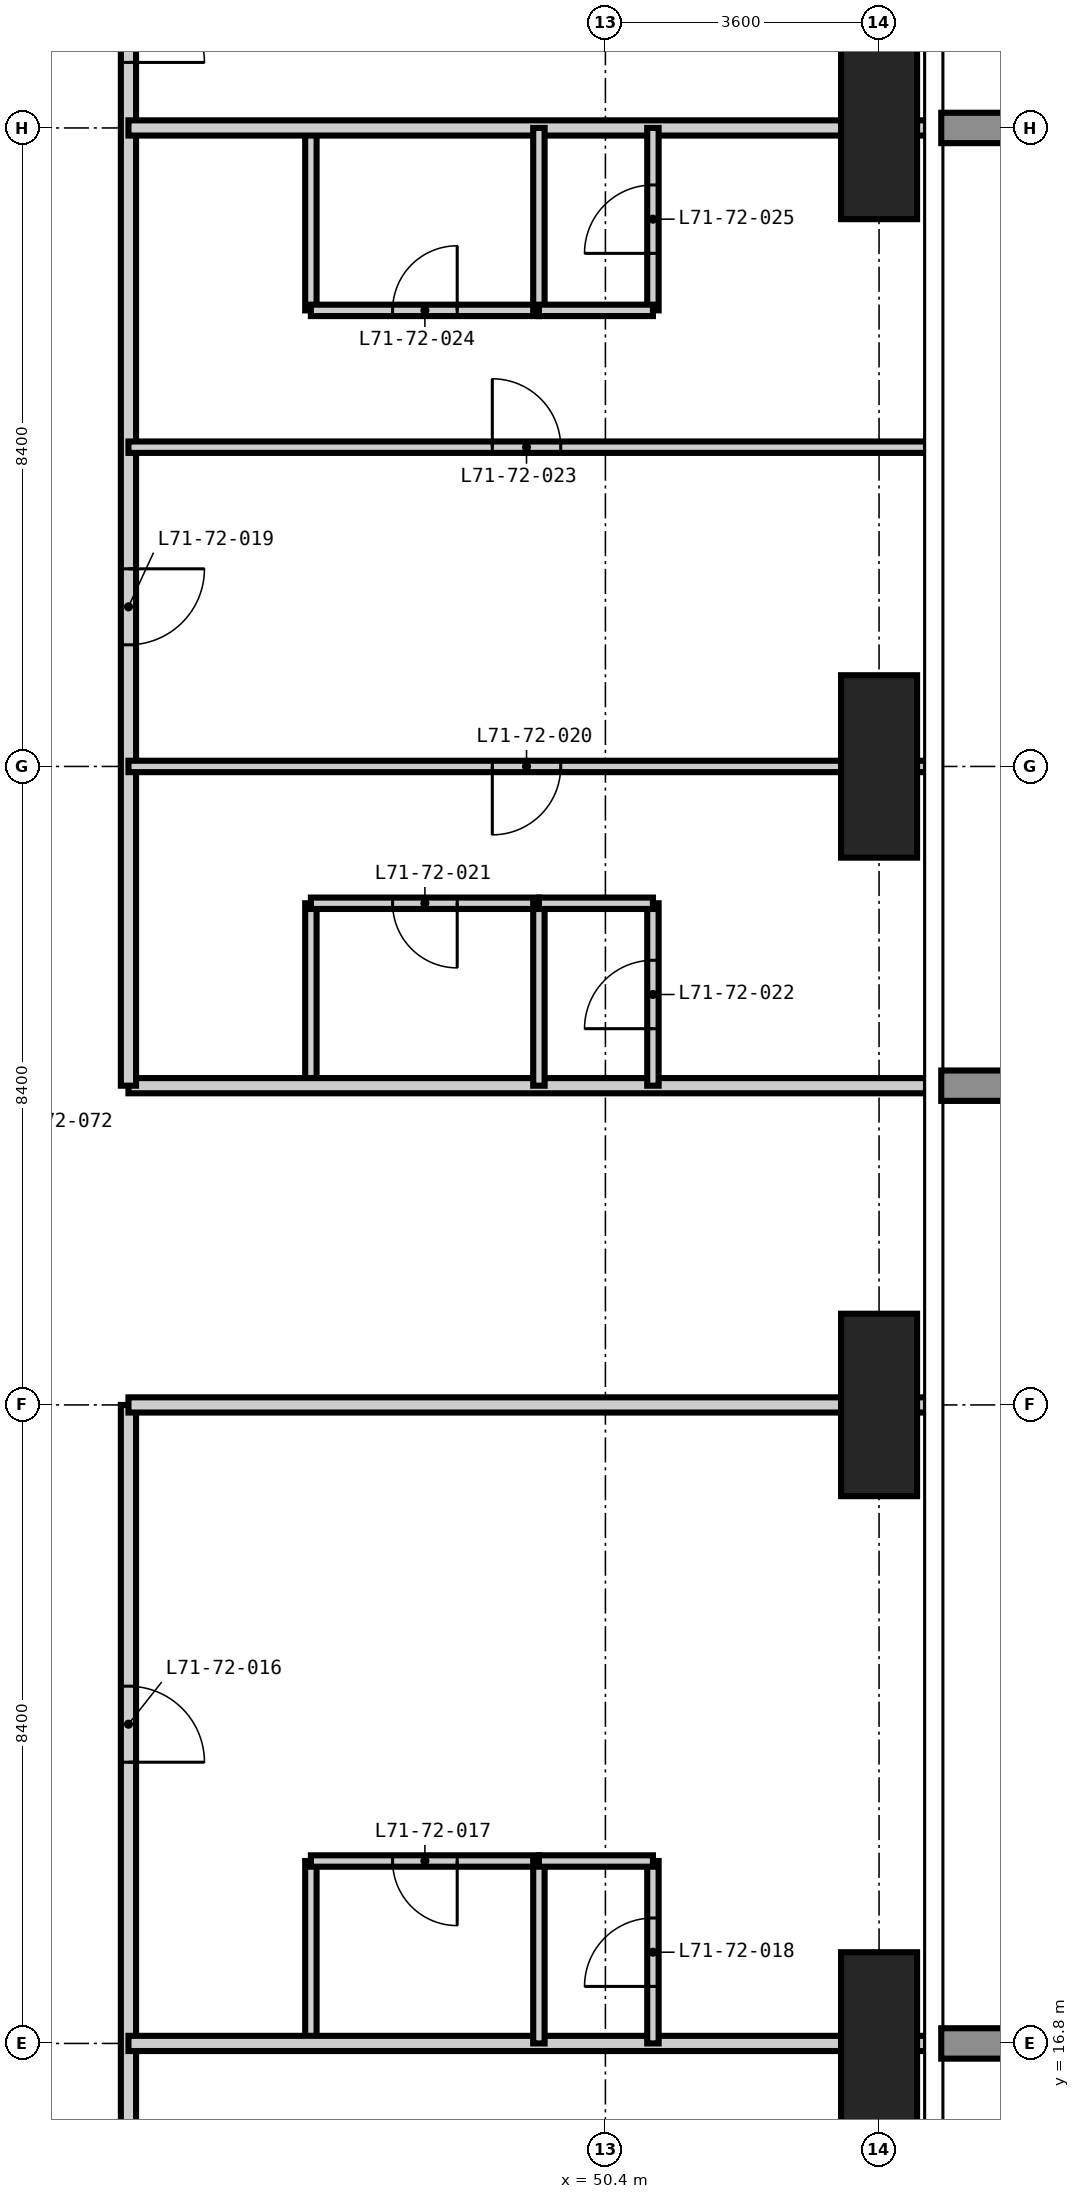
"""IFC4 building model, lengths in metres.
Left out: names, types, materials, properties, quantities, classifications, styles, units other than length and angle.
Written with IfcOpenShell. Run it as: python <this file> out.ifc"""

import sys

from ifc_helpers import new_model, si_unit, direction, frame, frame_2d, origin, origin_2d, place, context, subcontext, project, spatial, rectangle, extrude, element, fill, save


model = new_model("IFC4")
c1 = context("Model", 3, precision=1e-05, world=origin(), true_north=direction((0.0, 1.0)))
c2 = subcontext(c1, "Body", "Model", "MODEL_VIEW")
j1 = project(units=[si_unit("LENGTHUNIT", "METRE"), si_unit("PLANEANGLEUNIT", "RADIAN")], contexts=[c1])
p1 = place(None, origin())
s1 = spatial("IfcSite", under=j1, at=p1, CompositionType="ELEMENT")
p2 = place(p1, origin())
s2 = spatial("IfcBuilding", under=s1, at=p2, CompositionType="ELEMENT")
p3 = place(p2, frame((0.0, 0.0, 276.3)))
s3 = spatial("IfcBuildingStorey", under=s2, at=p3, CompositionType="ELEMENT", Elevation=276.3)
for number, where, z_axis, x_axis in (
    (1, (54.0, 16.8, -0.35), (0.0, 0.0, 1.0), (1.0, 0.0, 0.0)),
    (2, (54.0, 25.2, -0.35), (0.0, 0.0, 1.0), (1.0, 0.0, 0.0)),
    (3, (54.0, 33.6, -0.35), (0.0, 0.0, 1.0), (1.0, 0.0, 0.0)),
    (4, (54.0, 42.0, -0.35), (0.0, 0.0, 1.0), (1.0, 0.0, 0.0)),
):
    element("IfcColumn", number, at=place(p3, frame(where, z_axis=z_axis, x_axis=x_axis)), inside=s3, PredefinedType="COLUMN", context=c2, shape_type="SweptSolid", body=[
        extrude(rectangle(XDim=1.0, YDim=2.4, at=origin_2d()), origin(), (0.0, 0.0, 1.0), 3.9),
    ])
p4 = place(p3, frame((46.525, 16.8, 0.0), z_axis=(0.0, 0.0, 1.0), x_axis=(0.0, 1.0, 0.0)))
e5 = element("IfcWall", 5, at=p4, inside=s3, PredefinedType="PARTITIONING", context=c2, shape_type="SweptSolid", body=[
    extrude(rectangle(XDim=2.4, YDim=0.15, at=frame_2d((1.2, 0.0))), origin(), (0.0, 0.0, 1.0), 3.55),
])
p5 = place(p3, frame((46.525, 29.4, 0.0), z_axis=(0.0, 0.0, 1.0), x_axis=(0.0, 1.0, 0.0)))
e6 = element("IfcWall", 6, at=p5, inside=s3, PredefinedType="PARTITIONING", context=c2, shape_type="SweptSolid", body=[
    extrude(rectangle(XDim=2.4, YDim=0.15, at=frame_2d((1.2, 0.0))), origin(), (0.0, 0.0, 1.0), 3.55),
])
p6 = place(p3, frame((46.525, 39.6, 0.0), z_axis=(0.0, 0.0, 1.0), x_axis=(0.0, 1.0, 0.0)))
e7 = element("IfcWall", 7, at=p6, inside=s3, PredefinedType="PARTITIONING", context=c2, shape_type="SweptSolid", body=[
    extrude(rectangle(XDim=2.4, YDim=0.15, at=frame_2d((1.2, 0.0))), origin(), (0.0, 0.0, 1.0), 3.55),
])
p7 = place(p3, frame((46.525, 19.2, 0.0), z_axis=(0.0, 0.0, 1.0), x_axis=(1.0, 0.0, 0.0)))
e8 = element("IfcWall", 8, at=p7, inside=s3, PredefinedType="PARTITIONING", context=c2, shape_type="SweptSolid", body=[
    extrude(rectangle(XDim=3.0, YDim=0.15, at=frame_2d((1.5, 0.0))), origin(), (0.0, 0.0, 1.0), 3.55),
])
p8 = place(p7, frame((1.075, 0.0, 0.0)))
e9 = element("IfcOpeningElement", 9, at=p8, cuts=e8, PredefinedType="OPENING", context=c2, shape_type="SweptSolid", body=[
    extrude(rectangle(XDim=0.85, YDim=2.1, at=frame_2d((0.425, 1.05))), frame((0.0, 0.085, 0.0), z_axis=(0.0, -1.0, 0.0), x_axis=(1.0, 0.0, 0.0)), (0.0, 0.0, 1.0), 0.17),
])
p9 = place(p3, frame((46.525, 31.8, 0.0), z_axis=(0.0, 0.0, 1.0), x_axis=(1.0, 0.0, 0.0)))
e10 = element("IfcWall", 10, at=p9, inside=s3, PredefinedType="PARTITIONING", context=c2, shape_type="SweptSolid", body=[
    extrude(rectangle(XDim=3.0, YDim=0.15, at=frame_2d((1.5, 0.0))), origin(), (0.0, 0.0, 1.0), 3.55),
])
p10 = place(p9, frame((1.075, 0.0, 0.0)))
e11 = element("IfcOpeningElement", 11, at=p10, cuts=e10, PredefinedType="OPENING", context=c2, shape_type="SweptSolid", body=[
    extrude(rectangle(XDim=0.85, YDim=2.1, at=frame_2d((0.425, 1.05))), frame((0.0, 0.085, 0.0), z_axis=(0.0, -1.0, 0.0), x_axis=(1.0, 0.0, 0.0)), (0.0, 0.0, 1.0), 0.17),
])
p11 = place(p3, frame((46.525, 39.6, 0.0), z_axis=(0.0, 0.0, 1.0), x_axis=(1.0, 0.0, 0.0)))
e12 = element("IfcWall", 12, at=p11, inside=s3, PredefinedType="PARTITIONING", context=c2, shape_type="SweptSolid", body=[
    extrude(rectangle(XDim=3.0, YDim=0.15, at=frame_2d((1.5, 0.0))), origin(), (0.0, 0.0, 1.0), 3.55),
])
p12 = place(p11, frame((1.075, 0.0, 0.0)))
e13 = element("IfcOpeningElement", 13, at=p12, cuts=e12, PredefinedType="OPENING", context=c2, shape_type="SweptSolid", body=[
    extrude(rectangle(XDim=0.85, YDim=2.1, at=frame_2d((0.425, 1.05))), frame((0.0, 0.085, 0.0), z_axis=(0.0, -1.0, 0.0), x_axis=(1.0, 0.0, 0.0)), (0.0, 0.0, 1.0), 0.17),
])
p13 = place(p3, frame((44.125, 29.4, 0.0), z_axis=(0.0, 0.0, 1.0), x_axis=(1.0, 0.0, 0.0)))
e14 = element("IfcWall", 14, at=p13, inside=s3, PredefinedType="PARTITIONING", context=c2, shape_type="SweptSolid", body=[
    extrude(rectangle(XDim=10.493, YDim=0.2, at=frame_2d((5.247, 0.0))), origin(), (0.0, 0.0, 1.0), 3.55),
])
p14 = place(p3, frame((44.125, 25.2, 0.0), z_axis=(0.0, 0.0, 1.0), x_axis=(0.0, -1.0, 0.0)))
e15 = element("IfcWall", 15, at=p14, inside=s3, PredefinedType="PARTITIONING", context=c2, shape_type="SweptSolid", body=[
    extrude(rectangle(XDim=11.725, YDim=0.2, at=frame_2d((5.862, 0.0))), origin(), (0.0, 0.0, 1.0), 3.55),
])
p15 = place(p14, frame((3.7, 0.0, 0.0)))
e16 = element("IfcOpeningElement", 16, at=p15, cuts=e15, PredefinedType="OPENING", context=c2, shape_type="SweptSolid", body=[
    extrude(rectangle(XDim=1.0, YDim=2.2, at=frame_2d((0.5, 1.1))), frame((0.0, 0.11, 0.0), z_axis=(0.0, -1.0, 0.0), x_axis=(1.0, 0.0, 0.0)), (0.0, 0.0, 1.0), 0.22),
])
p16 = place(p14, frame((9.563, 0.0, 0.0)))
e17 = element("IfcOpeningElement", 17, at=p16, cuts=e15, PredefinedType="OPENING", context=c2, shape_type="SweptSolid", body=[
    extrude(rectangle(XDim=1.0, YDim=2.2, at=frame_2d((0.5, 1.1))), frame((0.0, 0.11, 0.0), z_axis=(0.0, -1.0, 0.0), x_axis=(1.0, 0.0, 0.0)), (0.0, 0.0, 1.0), 0.22),
])
p17 = place(p3, frame((44.125, 44.725, 0.0), z_axis=(0.0, 0.0, 1.0), x_axis=(0.0, -1.0, 0.0)))
e18 = element("IfcWall", 18, at=p17, inside=s3, PredefinedType="PARTITIONING", context=c2, shape_type="SweptSolid", body=[
    extrude(rectangle(XDim=15.325, YDim=0.2, at=frame_2d((7.663, 0.0))), origin(), (0.0, 0.0, 1.0), 3.55),
])
p18 = place(p17, frame((8.525, 0.0, 0.0)))
e19 = element("IfcOpeningElement", 19, at=p18, cuts=e18, PredefinedType="OPENING", context=c2, shape_type="SweptSolid", body=[
    extrude(rectangle(XDim=1.0, YDim=2.2, at=frame_2d((0.5, 1.1))), frame((0.0, 0.11, 0.0), z_axis=(0.0, -1.0, 0.0), x_axis=(1.0, 0.0, 0.0)), (0.0, 0.0, 1.0), 0.22),
])
p19 = place(p17, frame((0.863, 0.0, 0.0)))
e20 = element("IfcOpeningElement", 20, at=p19, cuts=e18, PredefinedType="OPENING", context=c2, shape_type="SweptSolid", body=[
    extrude(rectangle(XDim=1.0, YDim=2.2, at=frame_2d((0.5, 1.1))), frame((0.0, 0.11, 0.0), z_axis=(0.0, -1.0, 0.0), x_axis=(1.0, 0.0, 0.0)), (0.0, 0.0, 1.0), 0.22),
])
for number, where, z_axis, x_axis in (
    (21, (54.618, 25.2, 0.0), (0.0, 0.0, 1.0), (-1.0, 0.0, 0.0)),
    (22, (44.125, 16.8, 0.0), (0.0, 0.0, 1.0), (1.0, 0.0, 0.0)),
    (23, (44.125, 42.0, 0.0), (0.0, 0.0, 1.0), (1.0, 0.0, 0.0)),
):
    element("IfcWall", number, at=place(p3, frame(where, z_axis=z_axis, x_axis=x_axis)), inside=s3, PredefinedType="PARTITIONING", context=c2, shape_type="SweptSolid", body=[
        extrude(rectangle(XDim=10.493, YDim=0.2, at=frame_2d((5.247, 0.0))), origin(), (0.0, 0.0, 1.0), 3.55),
    ])
p20 = place(p3, frame((49.525, 16.8, 0.0), z_axis=(0.0, 0.0, 1.0), x_axis=(0.0, 1.0, 0.0)))
e24 = element("IfcWall", 24, at=p20, inside=s3, PredefinedType="PARTITIONING", context=c2, shape_type="SweptSolid", body=[
    extrude(rectangle(XDim=2.4, YDim=0.15, at=frame_2d((1.2, 0.0))), origin(), (0.0, 0.0, 1.0), 3.55),
])
p21 = place(p3, frame((49.525, 29.4, 0.0), z_axis=(0.0, 0.0, 1.0), x_axis=(0.0, 1.0, 0.0)))
e25 = element("IfcWall", 25, at=p21, inside=s3, PredefinedType="PARTITIONING", context=c2, shape_type="SweptSolid", body=[
    extrude(rectangle(XDim=2.4, YDim=0.15, at=frame_2d((1.2, 0.0))), origin(), (0.0, 0.0, 1.0), 3.55),
])
p22 = place(p3, frame((49.525, 39.6, 0.0), z_axis=(0.0, 0.0, 1.0), x_axis=(0.0, 1.0, 0.0)))
e26 = element("IfcWall", 26, at=p22, inside=s3, PredefinedType="PARTITIONING", context=c2, shape_type="SweptSolid", body=[
    extrude(rectangle(XDim=2.4, YDim=0.15, at=frame_2d((1.2, 0.0))), origin(), (0.0, 0.0, 1.0), 3.55),
])
p23 = place(p3, frame((51.025, 16.8, 0.0), z_axis=(0.0, 0.0, 1.0), x_axis=(0.0, 1.0, 0.0)))
e27 = element("IfcWall", 27, at=p23, inside=s3, PredefinedType="PARTITIONING", context=c2, shape_type="SweptSolid", body=[
    extrude(rectangle(XDim=2.4, YDim=0.15, at=frame_2d((1.2, 0.0))), origin(), (0.0, 0.0, 1.0), 3.55),
])
p24 = place(p23, frame((0.75, 0.0, 0.0)))
e28 = element("IfcOpeningElement", 28, at=p24, cuts=e27, PredefinedType="OPENING", context=c2, shape_type="SweptSolid", body=[
    extrude(rectangle(XDim=0.9, YDim=2.1, at=frame_2d((0.45, 1.05))), frame((0.0, 0.085, 0.0), z_axis=(0.0, -1.0, 0.0), x_axis=(1.0, 0.0, 0.0)), (0.0, 0.0, 1.0), 0.17),
])
p25 = place(p3, frame((51.025, 29.4, 0.0), z_axis=(0.0, 0.0, 1.0), x_axis=(0.0, 1.0, 0.0)))
e29 = element("IfcWall", 29, at=p25, inside=s3, PredefinedType="PARTITIONING", context=c2, shape_type="SweptSolid", body=[
    extrude(rectangle(XDim=2.4, YDim=0.15, at=frame_2d((1.2, 0.0))), origin(), (0.0, 0.0, 1.0), 3.55),
])
p26 = place(p25, frame((0.75, 0.0, 0.0)))
e30 = element("IfcOpeningElement", 30, at=p26, cuts=e29, PredefinedType="OPENING", context=c2, shape_type="SweptSolid", body=[
    extrude(rectangle(XDim=0.9, YDim=2.1, at=frame_2d((0.45, 1.05))), frame((0.0, 0.085, 0.0), z_axis=(0.0, -1.0, 0.0), x_axis=(1.0, 0.0, 0.0)), (0.0, 0.0, 1.0), 0.17),
])
p27 = place(p3, frame((51.025, 39.6, 0.0), z_axis=(0.0, 0.0, 1.0), x_axis=(0.0, 1.0, 0.0)))
e31 = element("IfcWall", 31, at=p27, inside=s3, PredefinedType="PARTITIONING", context=c2, shape_type="SweptSolid", body=[
    extrude(rectangle(XDim=2.4, YDim=0.15, at=frame_2d((1.2, 0.0))), origin(), (0.0, 0.0, 1.0), 3.55),
])
p28 = place(p27, frame((0.75, 0.0, 0.0)))
e32 = element("IfcOpeningElement", 32, at=p28, cuts=e31, PredefinedType="OPENING", context=c2, shape_type="SweptSolid", body=[
    extrude(rectangle(XDim=0.9, YDim=2.1, at=frame_2d((0.45, 1.05))), frame((0.0, 0.085, 0.0), z_axis=(0.0, -1.0, 0.0), x_axis=(1.0, 0.0, 0.0)), (0.0, 0.0, 1.0), 0.17),
])
for number, where, z_axis, x_axis in (
    (33, (49.525, 19.2, 0.0), (0.0, 0.0, 1.0), (1.0, 0.0, 0.0)),
    (34, (49.525, 31.8, 0.0), (0.0, 0.0, 1.0), (1.0, 0.0, 0.0)),
):
    element("IfcWall", number, at=place(p3, frame(where, z_axis=z_axis, x_axis=x_axis)), inside=s3, PredefinedType="PARTITIONING", context=c2, shape_type="SweptSolid", body=[
        extrude(rectangle(XDim=1.5, YDim=0.15, at=frame_2d((0.75, 0.0))), origin(), (0.0, 0.0, 1.0), 3.55),
    ])
p29 = place(p3, frame((44.125, 33.6, 0.0), z_axis=(0.0, 0.0, 1.0), x_axis=(1.0, 0.0, 0.0)))
e35 = element("IfcWall", 35, at=p29, inside=s3, PredefinedType="PARTITIONING", context=c2, shape_type="SweptSolid", body=[
    extrude(rectangle(XDim=10.493, YDim=0.15, at=frame_2d((5.247, 0.0))), origin(), (0.0, 0.0, 1.0), 3.55),
])
p30 = place(p29, frame((4.787, 0.0, 0.0)))
e36 = element("IfcOpeningElement", 36, at=p30, cuts=e35, PredefinedType="OPENING", context=c2, shape_type="SweptSolid", body=[
    extrude(rectangle(XDim=0.9, YDim=2.1, at=frame_2d((0.45, 1.05))), frame((0.0, 0.085, 0.0), z_axis=(0.0, -1.0, 0.0), x_axis=(1.0, 0.0, 0.0)), (0.0, 0.0, 1.0), 0.17),
])
p31 = place(p3, frame((44.125, 37.8, 0.0), z_axis=(0.0, 0.0, 1.0), x_axis=(1.0, 0.0, 0.0)))
e37 = element("IfcWall", 37, at=p31, inside=s3, PredefinedType="PARTITIONING", context=c2, shape_type="SweptSolid", body=[
    extrude(rectangle(XDim=10.493, YDim=0.15, at=frame_2d((5.247, 0.0))), origin(), (0.0, 0.0, 1.0), 3.55),
])
p32 = place(p31, frame((4.787, 0.0, 0.0)))
e38 = element("IfcOpeningElement", 38, at=p32, cuts=e37, PredefinedType="OPENING", context=c2, shape_type="SweptSolid", body=[
    extrude(rectangle(XDim=0.9, YDim=2.1, at=frame_2d((0.45, 1.05))), frame((0.0, 0.085, 0.0), z_axis=(0.0, -1.0, 0.0), x_axis=(1.0, 0.0, 0.0)), (0.0, 0.0, 1.0), 0.17),
])
p33 = place(p3, frame((49.525, 39.6, 0.0), z_axis=(0.0, 0.0, 1.0), x_axis=(1.0, 0.0, 0.0)))
e39 = element("IfcWall", 39, at=p33, inside=s3, PredefinedType="PARTITIONING", context=c2, shape_type="SweptSolid", body=[
    extrude(rectangle(XDim=1.5, YDim=0.15, at=frame_2d((0.75, 0.0))), origin(), (0.0, 0.0, 1.0), 3.55),
])
p34 = place(p15, origin())
e40 = element("IfcDoor", 40, at=p34, inside=s3, OperationType="SINGLE_SWING_RIGHT", PredefinedType="DOOR", context=c2, shape_type="SweptSolid", body=[
    extrude(rectangle(XDim=1.0, YDim=2.2, at=frame_2d((0.5, 1.1))), frame((0.0, 0.025, 0.0), z_axis=(0.0, -1.0, 0.0), x_axis=(1.0, 0.0, 0.0)), (0.0, 0.0, 1.0), 0.05),
])
fill(e16, e40)
p35 = place(p8, frame((0.85, 0.0, 0.0), z_axis=(0.0, 0.0, 1.0), x_axis=(-1.0, 0.0, 0.0)))
e41 = element("IfcDoor", 41, at=p35, inside=s3, OperationType="SINGLE_SWING_LEFT", PredefinedType="DOOR", context=c2, shape_type="SweptSolid", body=[
    extrude(rectangle(XDim=0.85, YDim=2.1, at=frame_2d((0.425, 1.05))), frame((0.0, 0.025, 0.0), z_axis=(0.0, -1.0, 0.0), x_axis=(1.0, 0.0, 0.0)), (0.0, 0.0, 1.0), 0.05),
])
fill(e9, e41)
p36 = place(p24, origin())
e42 = element("IfcDoor", 42, at=p36, inside=s3, OperationType="SINGLE_SWING_LEFT", PredefinedType="DOOR", context=c2, shape_type="SweptSolid", body=[
    extrude(rectangle(XDim=0.9, YDim=2.1, at=frame_2d((0.45, 1.05))), frame((0.0, 0.025, 0.0), z_axis=(0.0, -1.0, 0.0), x_axis=(1.0, 0.0, 0.0)), (0.0, 0.0, 1.0), 0.05),
])
fill(e28, e42)
p37 = place(p18, origin())
e43 = element("IfcDoor", 43, at=p37, inside=s3, OperationType="SINGLE_SWING_LEFT", PredefinedType="DOOR", context=c2, shape_type="SweptSolid", body=[
    extrude(rectangle(XDim=1.0, YDim=2.2, at=frame_2d((0.5, 1.1))), frame((0.0, 0.025, 0.0), z_axis=(0.0, -1.0, 0.0), x_axis=(1.0, 0.0, 0.0)), (0.0, 0.0, 1.0), 0.05),
])
fill(e19, e43)
p38 = place(p30, frame((0.9, 0.0, 0.0), z_axis=(0.0, 0.0, 1.0), x_axis=(-1.0, 0.0, 0.0)))
e44 = element("IfcDoor", 44, at=p38, inside=s3, OperationType="SINGLE_SWING_RIGHT", PredefinedType="DOOR", context=c2, shape_type="SweptSolid", body=[
    extrude(rectangle(XDim=0.9, YDim=2.1, at=frame_2d((0.45, 1.05))), frame((0.0, 0.025, 0.0), z_axis=(0.0, -1.0, 0.0), x_axis=(1.0, 0.0, 0.0)), (0.0, 0.0, 1.0), 0.05),
])
fill(e36, e44)
p39 = place(p10, frame((0.85, 0.0, 0.0), z_axis=(0.0, 0.0, 1.0), x_axis=(-1.0, 0.0, 0.0)))
e45 = element("IfcDoor", 45, at=p39, inside=s3, OperationType="SINGLE_SWING_LEFT", PredefinedType="DOOR", context=c2, shape_type="SweptSolid", body=[
    extrude(rectangle(XDim=0.85, YDim=2.1, at=frame_2d((0.425, 1.05))), frame((0.0, 0.025, 0.0), z_axis=(0.0, -1.0, 0.0), x_axis=(1.0, 0.0, 0.0)), (0.0, 0.0, 1.0), 0.05),
])
fill(e11, e45)
p40 = place(p26, origin())
e46 = element("IfcDoor", 46, at=p40, inside=s3, OperationType="SINGLE_SWING_LEFT", PredefinedType="DOOR", context=c2, shape_type="SweptSolid", body=[
    extrude(rectangle(XDim=0.9, YDim=2.1, at=frame_2d((0.45, 1.05))), frame((0.0, 0.025, 0.0), z_axis=(0.0, -1.0, 0.0), x_axis=(1.0, 0.0, 0.0)), (0.0, 0.0, 1.0), 0.05),
])
fill(e30, e46)
p41 = place(p32, origin())
e47 = element("IfcDoor", 47, at=p41, inside=s3, OperationType="SINGLE_SWING_LEFT", PredefinedType="DOOR", context=c2, shape_type="SweptSolid", body=[
    extrude(rectangle(XDim=0.9, YDim=2.1, at=frame_2d((0.45, 1.05))), frame((0.0, 0.025, 0.0), z_axis=(0.0, -1.0, 0.0), x_axis=(1.0, 0.0, 0.0)), (0.0, 0.0, 1.0), 0.05),
])
fill(e38, e47)
p42 = place(p12, origin())
e48 = element("IfcDoor", 48, at=p42, inside=s3, OperationType="SINGLE_SWING_RIGHT", PredefinedType="DOOR", context=c2, shape_type="SweptSolid", body=[
    extrude(rectangle(XDim=0.85, YDim=2.1, at=frame_2d((0.425, 1.05))), frame((0.0, 0.025, 0.0), z_axis=(0.0, -1.0, 0.0), x_axis=(1.0, 0.0, 0.0)), (0.0, 0.0, 1.0), 0.05),
])
fill(e13, e48)
p43 = place(p28, origin())
e49 = element("IfcDoor", 49, at=p43, inside=s3, OperationType="SINGLE_SWING_LEFT", PredefinedType="DOOR", context=c2, shape_type="SweptSolid", body=[
    extrude(rectangle(XDim=0.9, YDim=2.1, at=frame_2d((0.45, 1.05))), frame((0.0, 0.025, 0.0), z_axis=(0.0, -1.0, 0.0), x_axis=(1.0, 0.0, 0.0)), (0.0, 0.0, 1.0), 0.05),
])
fill(e32, e49)
p44 = place(p19, origin())
e50 = element("IfcDoor", 50, at=p44, inside=s3, OperationType="SINGLE_SWING_RIGHT", PredefinedType="DOOR", context=c2, shape_type="SweptSolid", body=[
    extrude(rectangle(XDim=1.0, YDim=2.2, at=frame_2d((0.5, 1.1))), frame((0.0, 0.025, 0.0), z_axis=(0.0, -1.0, 0.0), x_axis=(1.0, 0.0, 0.0)), (0.0, 0.0, 1.0), 0.05),
])
fill(e20, e50)
save(model, sys.argv[1])
